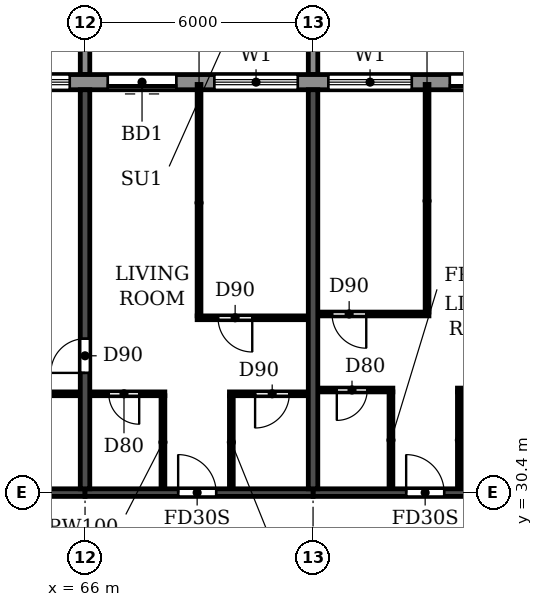
"""IFC4 building model, lengths in metres.
Left out: names, types, materials, properties, quantities, classifications, styles, units other than length and angle.
Written with IfcOpenShell. Run it as: python <this file> out.ifc"""

import sys

from ifc_helpers import new_model, si_unit, direction, frame, frame_2d, origin, place, context, subcontext, project, spatial, polyline, rectangle, outline, extrude, source, transform, mapped, element, fill, save


model = new_model("IFC4")
c1 = context("Model", 3, precision=1e-05, world=origin(), true_north=direction((0.0, 1.0)))
c2 = subcontext(c1, "Body", "Model", "MODEL_VIEW")
j1 = project(units=[si_unit("LENGTHUNIT", "METRE"), si_unit("PLANEANGLEUNIT", "RADIAN")], contexts=[c1])
p1 = place(None, origin())
s1 = spatial("IfcSite", under=j1, at=p1, CompositionType="ELEMENT")
p2 = place(p1, origin())
s2 = spatial("IfcBuilding", under=s1, at=p2, CompositionType="ELEMENT")
p3 = place(p2, frame((0.0, 0.0, 171.9)))
s3 = spatial("IfcBuildingStorey", under=s2, at=p3, CompositionType="ELEMENT", Elevation=171.9)
p4 = place(p3, frame((66.0, 30.5, 0.0), z_axis=(0.0, 0.0, 1.0), x_axis=(0.0, 1.0, 0.0)))
e1 = element("IfcWall", 1, at=p4, inside=s3, PredefinedType="SHEAR", context=c2, shape_type="SweptSolid", body=[
    extrude(rectangle(XDim=10.5, YDim=0.25, at=frame_2d((5.25, 0.0))), origin(), (0.0, 0.0, 1.0), 3.08),
])
p5 = place(p4, frame((3.05, 0.0, 0.0)))
e2 = element("IfcOpeningElement", 2, at=p5, cuts=e1, PredefinedType="OPENING", context=c2, shape_type="SweptSolid", body=[
    extrude(rectangle(XDim=0.9, YDim=2.1, at=frame_2d((0.45, 1.05))), frame((0.0, 0.135, 0.0), z_axis=(0.0, -1.0, 0.0), x_axis=(1.0, 0.0, 0.0)), (0.0, 0.0, 1.0), 0.27),
])
p6 = place(p3, frame((72.0, 30.5, 0.0), z_axis=(0.0, 0.0, 1.0), x_axis=(0.0, 1.0, 0.0)))
e3 = element("IfcWall", 3, at=p6, inside=s3, PredefinedType="SHEAR", context=c2, shape_type="SweptSolid", body=[
    extrude(rectangle(XDim=10.5, YDim=0.25, at=frame_2d((5.25, 0.0))), origin(), (0.0, 0.0, 1.0), 3.08),
])
p7 = place(p3, frame((60.0, 30.4, 0.0), z_axis=(0.0, 0.0, 1.0), x_axis=(1.0, 0.0, 0.0)))
e4 = element("IfcWall", 4, at=p7, inside=s3, PredefinedType="SHEAR", context=c2, shape_type="SweptSolid", body=[
    extrude(rectangle(XDim=6.0, YDim=0.2, at=frame_2d((3.0, 0.0))), origin(), (0.0, 0.0, 1.0), 2.48),
])
p8 = place(p3, frame((66.0, 30.4, 0.0), z_axis=(0.0, 0.0, 1.0), x_axis=(1.0, 0.0, 0.0)))
e5 = element("IfcWall", 5, at=p8, inside=s3, PredefinedType="SHEAR", context=c2, shape_type="SweptSolid", body=[
    extrude(rectangle(XDim=6.0, YDim=0.2, at=frame_2d((3.0, 0.0))), origin(), (0.0, 0.0, 1.0), 2.48),
])
p9 = place(p8, frame((2.45, 0.0, 0.0)))
e6 = element("IfcOpeningElement", 6, at=p9, cuts=e5, PredefinedType="OPENING", context=c2, shape_type="SweptSolid", body=[
    extrude(rectangle(XDim=1.0, YDim=2.1, at=frame_2d((0.5, 1.05))), frame((0.0, 0.11, 0.0), z_axis=(0.0, -1.0, 0.0), x_axis=(1.0, 0.0, 0.0)), (0.0, 0.0, 1.0), 0.22),
])
p10 = place(p3, frame((72.0, 30.4, 0.0), z_axis=(0.0, 0.0, 1.0), x_axis=(1.0, 0.0, 0.0)))
e7 = element("IfcWall", 7, at=p10, inside=s3, PredefinedType="SHEAR", context=c2, shape_type="SweptSolid", body=[
    extrude(rectangle(XDim=6.0, YDim=0.2, at=frame_2d((3.0, 0.0))), origin(), (0.0, 0.0, 1.0), 2.48),
])
p11 = place(p10, frame((2.45, 0.0, 0.0)))
e8 = element("IfcOpeningElement", 8, at=p11, cuts=e7, PredefinedType="OPENING", context=c2, shape_type="SweptSolid", body=[
    extrude(rectangle(XDim=1.0, YDim=2.1, at=frame_2d((0.5, 1.05))), frame((0.0, 0.11, 0.0), z_axis=(0.0, -1.0, 0.0), x_axis=(1.0, 0.0, 0.0)), (0.0, 0.0, 1.0), 0.22),
])
p12 = place(p3, frame((79.317, 41.2, 0.0), z_axis=(0.0, 0.0, 1.0), x_axis=(-1.0, 0.0, 0.0)))
e9 = element("IfcWall", 9, at=p12, inside=s3, PredefinedType="STANDARD", context=c2, shape_type="SweptSolid", body=[
    extrude(rectangle(XDim=56.634, YDim=0.4, at=frame_2d((28.317, 0.0))), origin(), (0.0, 0.0, 1.0), 3.08),
])
p13 = place(p12, frame((52.717, 0.0, 0.9)))
e10 = element("IfcOpeningElement", 10, at=p13, cuts=e9, PredefinedType="OPENING", context=c2, shape_type="SweptSolid", body=[
    extrude(rectangle(XDim=2.2, YDim=1.5, at=frame_2d((1.1, 0.75))), frame((0.0, 0.21, 0.0), z_axis=(0.0, -1.0, 0.0), x_axis=(1.0, 0.0, 0.0)), (0.0, 0.0, 1.0), 0.42),
])
p14 = place(p12, frame((49.917, 0.0, 0.0)))
e11 = element("IfcOpeningElement", 11, at=p14, cuts=e9, PredefinedType="OPENING", context=c2, shape_type="SweptSolid", body=[
    extrude(rectangle(XDim=1.8, YDim=2.4, at=frame_2d((0.9, 1.2))), frame((0.0, 0.21, 0.0), z_axis=(0.0, -1.0, 0.0), x_axis=(1.0, 0.0, 0.0)), (0.0, 0.0, 1.0), 0.42),
])
p15 = place(p12, frame((46.717, 0.0, 0.9)))
e12 = element("IfcOpeningElement", 12, at=p15, cuts=e9, PredefinedType="OPENING", context=c2, shape_type="SweptSolid", body=[
    extrude(rectangle(XDim=2.2, YDim=1.5, at=frame_2d((1.1, 0.75))), frame((0.0, 0.21, 0.0), z_axis=(0.0, -1.0, 0.0), x_axis=(1.0, 0.0, 0.0)), (0.0, 0.0, 1.0), 0.42),
])
p16 = place(p12, frame((43.717, 0.0, 0.9)))
e13 = element("IfcOpeningElement", 13, at=p16, cuts=e9, PredefinedType="OPENING", context=c2, shape_type="SweptSolid", body=[
    extrude(rectangle(XDim=2.2, YDim=1.5, at=frame_2d((1.1, 0.75))), frame((0.0, 0.21, 0.0), z_axis=(0.0, -1.0, 0.0), x_axis=(1.0, 0.0, 0.0)), (0.0, 0.0, 1.0), 0.42),
])
p17 = place(p12, frame((40.917, 0.0, 0.0)))
e14 = element("IfcOpeningElement", 14, at=p17, cuts=e9, PredefinedType="OPENING", context=c2, shape_type="SweptSolid", body=[
    extrude(rectangle(XDim=1.8, YDim=2.4, at=frame_2d((0.9, 1.2))), frame((0.0, 0.21, 0.0), z_axis=(0.0, -1.0, 0.0), x_axis=(1.0, 0.0, 0.0)), (0.0, 0.0, 1.0), 0.42),
])
p18 = place(p12, frame((37.717, 0.0, 0.9)))
e15 = element("IfcOpeningElement", 15, at=p18, cuts=e9, PredefinedType="OPENING", context=c2, shape_type="SweptSolid", body=[
    extrude(rectangle(XDim=2.2, YDim=1.5, at=frame_2d((1.1, 0.75))), frame((0.0, 0.21, 0.0), z_axis=(0.0, -1.0, 0.0), x_axis=(1.0, 0.0, 0.0)), (0.0, 0.0, 1.0), 0.42),
])
p19 = place(p12, frame((34.717, 0.0, 0.9)))
e16 = element("IfcOpeningElement", 16, at=p19, cuts=e9, PredefinedType="OPENING", context=c2, shape_type="SweptSolid", body=[
    extrude(rectangle(XDim=2.2, YDim=1.5, at=frame_2d((1.1, 0.75))), frame((0.0, 0.21, 0.0), z_axis=(0.0, -1.0, 0.0), x_axis=(1.0, 0.0, 0.0)), (0.0, 0.0, 1.0), 0.42),
])
p20 = place(p12, frame((31.717, 0.0, 0.9)))
e17 = element("IfcOpeningElement", 17, at=p20, cuts=e9, PredefinedType="OPENING", context=c2, shape_type="SweptSolid", body=[
    extrude(rectangle(XDim=2.2, YDim=1.5, at=frame_2d((1.1, 0.75))), frame((0.0, 0.21, 0.0), z_axis=(0.0, -1.0, 0.0), x_axis=(1.0, 0.0, 0.0)), (0.0, 0.0, 1.0), 0.42),
])
p21 = place(p12, frame((28.717, 0.0, 0.9)))
e18 = element("IfcOpeningElement", 18, at=p21, cuts=e9, PredefinedType="OPENING", context=c2, shape_type="SweptSolid", body=[
    extrude(rectangle(XDim=2.2, YDim=1.5, at=frame_2d((1.1, 0.75))), frame((0.0, 0.21, 0.0), z_axis=(0.0, -1.0, 0.0), x_axis=(1.0, 0.0, 0.0)), (0.0, 0.0, 1.0), 0.42),
])
p22 = place(p12, frame((25.917, 0.0, 0.0)))
e19 = element("IfcOpeningElement", 19, at=p22, cuts=e9, PredefinedType="OPENING", context=c2, shape_type="SweptSolid", body=[
    extrude(rectangle(XDim=1.8, YDim=2.4, at=frame_2d((0.9, 1.2))), frame((0.0, 0.21, 0.0), z_axis=(0.0, -1.0, 0.0), x_axis=(1.0, 0.0, 0.0)), (0.0, 0.0, 1.0), 0.42),
])
p23 = place(p12, frame((22.717, 0.0, 0.9)))
e20 = element("IfcOpeningElement", 20, at=p23, cuts=e9, PredefinedType="OPENING", context=c2, shape_type="SweptSolid", body=[
    extrude(rectangle(XDim=2.2, YDim=1.5, at=frame_2d((1.1, 0.75))), frame((0.0, 0.21, 0.0), z_axis=(0.0, -1.0, 0.0), x_axis=(1.0, 0.0, 0.0)), (0.0, 0.0, 1.0), 0.42),
])
p24 = place(p12, frame((19.917, 0.0, 0.0)))
e21 = element("IfcOpeningElement", 21, at=p24, cuts=e9, PredefinedType="OPENING", context=c2, shape_type="SweptSolid", body=[
    extrude(rectangle(XDim=1.8, YDim=2.4, at=frame_2d((0.9, 1.2))), frame((0.0, 0.21, 0.0), z_axis=(0.0, -1.0, 0.0), x_axis=(1.0, 0.0, 0.0)), (0.0, 0.0, 1.0), 0.42),
])
p25 = place(p12, frame((16.717, 0.0, 0.9)))
e22 = element("IfcOpeningElement", 22, at=p25, cuts=e9, PredefinedType="OPENING", context=c2, shape_type="SweptSolid", body=[
    extrude(rectangle(XDim=2.2, YDim=1.5, at=frame_2d((1.1, 0.75))), frame((0.0, 0.21, 0.0), z_axis=(0.0, -1.0, 0.0), x_axis=(1.0, 0.0, 0.0)), (0.0, 0.0, 1.0), 0.42),
])
p26 = place(p12, frame((13.717, 0.0, 0.9)))
e23 = element("IfcOpeningElement", 23, at=p26, cuts=e9, PredefinedType="OPENING", context=c2, shape_type="SweptSolid", body=[
    extrude(rectangle(XDim=2.2, YDim=1.5, at=frame_2d((1.1, 0.75))), frame((0.0, 0.21, 0.0), z_axis=(0.0, -1.0, 0.0), x_axis=(1.0, 0.0, 0.0)), (0.0, 0.0, 1.0), 0.42),
])
p27 = place(p12, frame((10.917, 0.0, 0.0)))
e24 = element("IfcOpeningElement", 24, at=p27, cuts=e9, PredefinedType="OPENING", context=c2, shape_type="SweptSolid", body=[
    extrude(rectangle(XDim=1.8, YDim=2.4, at=frame_2d((0.9, 1.2))), frame((0.0, 0.21, 0.0), z_axis=(0.0, -1.0, 0.0), x_axis=(1.0, 0.0, 0.0)), (0.0, 0.0, 1.0), 0.42),
])
p28 = place(p12, frame((7.717, 0.0, 0.9)))
e25 = element("IfcOpeningElement", 25, at=p28, cuts=e9, PredefinedType="OPENING", context=c2, shape_type="SweptSolid", body=[
    extrude(rectangle(XDim=2.2, YDim=1.5, at=frame_2d((1.1, 0.75))), frame((0.0, 0.21, 0.0), z_axis=(0.0, -1.0, 0.0), x_axis=(1.0, 0.0, 0.0)), (0.0, 0.0, 1.0), 0.42),
])
p29 = place(p12, frame((4.717, 0.0, 0.9)))
e26 = element("IfcOpeningElement", 26, at=p29, cuts=e9, PredefinedType="OPENING", context=c2, shape_type="SweptSolid", body=[
    extrude(rectangle(XDim=2.2, YDim=1.5, at=frame_2d((1.1, 0.75))), frame((0.0, 0.21, 0.0), z_axis=(0.0, -1.0, 0.0), x_axis=(1.0, 0.0, 0.0)), (0.0, 0.0, 1.0), 0.42),
])
p30 = place(p12, frame((1.917, 0.0, 0.0)))
e27 = element("IfcOpeningElement", 27, at=p30, cuts=e9, PredefinedType="OPENING", context=c2, shape_type="SweptSolid", body=[
    extrude(rectangle(XDim=1.8, YDim=2.4, at=frame_2d((0.9, 1.2))), frame((0.0, 0.21, 0.0), z_axis=(0.0, -1.0, 0.0), x_axis=(1.0, 0.0, 0.0)), (0.0, 0.0, 1.0), 0.42),
])
m1 = source(origin(), c2, "Body", "SweptSolid", [
    extrude(outline(polyline([(0.0, 0.0), (0.25, 0.0), (0.25, 3.1), (0.0, 3.1), (0.0, 0.0)])), origin(), (0.0, 0.0, 1.0), 3.1),
])
for number, where in (
    (28, (65.875, 41.4, 0.0)),
    (29, (71.875, 41.4, 0.0)),
):
    element("IfcWall", number, at=place(p3, frame(where)), inside=s3, PredefinedType="STANDARD", context=c2, shape_type="MappedRepresentation", body=[
        mapped(m1, transform((0.0, 0.0, 0.0))),
    ])
p31 = place(p3, frame((63.1, 33.0, 0.0), z_axis=(0.0, 0.0, 1.0), x_axis=(1.0, 0.0, 0.0)))
e30 = element("IfcWall", 30, at=p31, inside=s3, PredefinedType="PARTITIONING", context=c2, shape_type="SweptSolid", body=[
    extrude(rectangle(XDim=2.765, YDim=0.1, at=frame_2d((1.382, 0.0))), origin(), (0.0, 0.0, 1.0), 3.08),
])
p32 = place(p31, frame((1.0, 0.0, 0.0)))
e31 = element("IfcOpeningElement", 31, at=p32, cuts=e30, PredefinedType="OPENING", context=c2, shape_type="SweptSolid", body=[
    extrude(rectangle(XDim=0.8, YDim=2.1, at=frame_2d((0.4, 1.05))), frame((0.0, 0.06, 0.0), z_axis=(0.0, -1.0, 0.0), x_axis=(1.0, 0.0, 0.0)), (0.0, 0.0, 1.0), 0.12),
])
p33 = place(p3, frame((66.135, 33.0, 0.0), z_axis=(0.0, 0.0, 1.0), x_axis=(1.0, 0.0, 0.0)))
e32 = element("IfcWall", 32, at=p33, inside=s3, PredefinedType="PARTITIONING", context=c2, shape_type="SweptSolid", body=[
    extrude(rectangle(XDim=1.965, YDim=0.1, at=frame_2d((0.982, 0.0))), origin(), (0.0, 0.0, 1.0), 3.08),
])
p34 = place(p33, frame((0.49, 0.0, 0.0)))
e33 = element("IfcOpeningElement", 33, at=p34, cuts=e32, PredefinedType="OPENING", context=c2, shape_type="SweptSolid", body=[
    extrude(rectangle(XDim=0.8, YDim=2.1, at=frame_2d((0.4, 1.05))), frame((0.0, 0.06, 0.0), z_axis=(0.0, -1.0, 0.0), x_axis=(1.0, 0.0, 0.0)), (0.0, 0.0, 1.0), 0.12),
])
p35 = place(p3, frame((69.8, 33.0, 0.0), z_axis=(0.0, 0.0, 1.0), x_axis=(1.0, 0.0, 0.0)))
e34 = element("IfcWall", 34, at=p35, inside=s3, PredefinedType="PARTITIONING", context=c2, shape_type="SweptSolid", body=[
    extrude(rectangle(XDim=2.065, YDim=0.1, at=frame_2d((1.032, 0.0))), origin(), (0.0, 0.0, 1.0), 3.08),
])
p36 = place(p35, frame((0.675, 0.0, 0.0)))
e35 = element("IfcOpeningElement", 35, at=p36, cuts=e34, PredefinedType="OPENING", context=c2, shape_type="SweptSolid", body=[
    extrude(rectangle(XDim=0.9, YDim=2.1, at=frame_2d((0.45, 1.05))), frame((0.0, 0.06, 0.0), z_axis=(0.0, -1.0, 0.0), x_axis=(1.0, 0.0, 0.0)), (0.0, 0.0, 1.0), 0.12),
])
p37 = place(p3, frame((72.135, 33.1, 0.0), z_axis=(0.0, 0.0, 1.0), x_axis=(1.0, 0.0, 0.0)))
e36 = element("IfcWall", 36, at=p37, inside=s3, PredefinedType="PARTITIONING", context=c2, shape_type="SweptSolid", body=[
    extrude(rectangle(XDim=1.965, YDim=0.1, at=frame_2d((0.982, 0.0))), origin(), (0.0, 0.0, 1.0), 3.08),
])
p38 = place(p37, frame((0.49, 0.0, 0.0)))
e37 = element("IfcOpeningElement", 37, at=p38, cuts=e36, PredefinedType="OPENING", context=c2, shape_type="SweptSolid", body=[
    extrude(rectangle(XDim=0.8, YDim=2.1, at=frame_2d((0.4, 1.05))), frame((0.0, 0.06, 0.0), z_axis=(0.0, -1.0, 0.0), x_axis=(1.0, 0.0, 0.0)), (0.0, 0.0, 1.0), 0.12),
])
p39 = place(p3, frame((75.8, 33.1, 0.0), z_axis=(0.0, 0.0, 1.0), x_axis=(1.0, 0.0, 0.0)))
e38 = element("IfcWall", 38, at=p39, inside=s3, PredefinedType="PARTITIONING", context=c2, shape_type="SweptSolid", body=[
    extrude(rectangle(XDim=2.065, YDim=0.1, at=frame_2d((1.032, 0.0))), origin(), (0.0, 0.0, 1.0), 3.08),
])
p40 = place(p39, frame((0.675, 0.0, 0.0)))
e39 = element("IfcOpeningElement", 39, at=p40, cuts=e38, PredefinedType="OPENING", context=c2, shape_type="SweptSolid", body=[
    extrude(rectangle(XDim=0.9, YDim=2.1, at=frame_2d((0.45, 1.05))), frame((0.0, 0.06, 0.0), z_axis=(0.0, -1.0, 0.0), x_axis=(1.0, 0.0, 0.0)), (0.0, 0.0, 1.0), 0.12),
])
p41 = place(p3, frame((68.95, 35.0, 0.0), z_axis=(0.0, 0.0, 1.0), x_axis=(1.0, 0.0, 0.0)))
e40 = element("IfcWall", 40, at=p41, inside=s3, PredefinedType="PARTITIONING", context=c2, shape_type="SweptSolid", body=[
    extrude(rectangle(XDim=2.915, YDim=0.1, at=frame_2d((1.458, 0.0))), origin(), (0.0, 0.0, 1.0), 3.08),
])
p42 = place(p41, frame((0.55, 0.0, 0.0)))
e41 = element("IfcOpeningElement", 41, at=p42, cuts=e40, PredefinedType="OPENING", context=c2, shape_type="SweptSolid", body=[
    extrude(rectangle(XDim=0.9, YDim=2.1, at=frame_2d((0.45, 1.05))), frame((0.0, 0.06, 0.0), z_axis=(0.0, -1.0, 0.0), x_axis=(1.0, 0.0, 0.0)), (0.0, 0.0, 1.0), 0.12),
])
p43 = place(p3, frame((72.135, 35.1, 0.0), z_axis=(0.0, 0.0, 1.0), x_axis=(1.0, 0.0, 0.0)))
e42 = element("IfcWall", 42, at=p43, inside=s3, PredefinedType="PARTITIONING", context=c2, shape_type="SweptSolid", body=[
    extrude(rectangle(XDim=2.915, YDim=0.1, at=frame_2d((1.458, 0.0))), origin(), (0.0, 0.0, 1.0), 3.08),
])
p44 = place(p43, frame((0.365, 0.0, 0.0)))
e43 = element("IfcOpeningElement", 43, at=p44, cuts=e42, PredefinedType="OPENING", context=c2, shape_type="SweptSolid", body=[
    extrude(rectangle(XDim=0.9, YDim=2.1, at=frame_2d((0.45, 1.05))), frame((0.0, 0.06, 0.0), z_axis=(0.0, -1.0, 0.0), x_axis=(1.0, 0.0, 0.0)), (0.0, 0.0, 1.0), 0.12),
])
p45 = place(p3, frame((68.05, 30.51, 0.0), z_axis=(0.0, 0.0, 1.0), x_axis=(0.0, 1.0, 0.0)))
e44 = element("IfcWall", 44, at=p45, inside=s3, PredefinedType="PARTITIONING", context=c2, shape_type="SweptSolid", body=[
    extrude(rectangle(XDim=2.44, YDim=0.1, at=frame_2d((1.22, 0.0))), origin(), (0.0, 0.0, 1.0), 3.08),
])
p46 = place(p3, frame((69.0, 35.05, 0.0), z_axis=(0.0, 0.0, 1.0), x_axis=(0.0, 1.0, 0.0)))
e45 = element("IfcWall", 45, at=p46, inside=s3, PredefinedType="PARTITIONING", context=c2, shape_type="SweptSolid", body=[
    extrude(rectangle(XDim=6.09, YDim=0.1, at=frame_2d((3.045, 0.0))), origin(), (0.0, 0.0, 1.0), 3.08),
])
p47 = place(p3, frame((69.85, 30.51, 0.0), z_axis=(0.0, 0.0, 1.0), x_axis=(0.0, 1.0, 0.0)))
e46 = element("IfcWall", 46, at=p47, inside=s3, PredefinedType="PARTITIONING", context=c2, shape_type="SweptSolid", body=[
    extrude(rectangle(XDim=2.44, YDim=0.1, at=frame_2d((1.22, 0.0))), origin(), (0.0, 0.0, 1.0), 3.08),
])
p48 = place(p3, frame((74.05, 30.51, 0.0), z_axis=(0.0, 0.0, 1.0), x_axis=(0.0, 1.0, 0.0)))
e47 = element("IfcWall", 47, at=p48, inside=s3, PredefinedType="PARTITIONING", context=c2, shape_type="SweptSolid", body=[
    extrude(rectangle(XDim=2.54, YDim=0.1, at=frame_2d((1.27, 0.0))), origin(), (0.0, 0.0, 1.0), 3.08),
])
p49 = place(p3, frame((75.0, 35.15, 0.0), z_axis=(0.0, 0.0, 1.0), x_axis=(0.0, 1.0, 0.0)))
e48 = element("IfcWall", 48, at=p49, inside=s3, PredefinedType="PARTITIONING", context=c2, shape_type="SweptSolid", body=[
    extrude(rectangle(XDim=5.99, YDim=0.1, at=frame_2d((2.995, 0.0))), origin(), (0.0, 0.0, 1.0), 3.08),
])
p50 = place(p3, frame((75.85, 30.51, 0.0), z_axis=(0.0, 0.0, 1.0), x_axis=(0.0, 1.0, 0.0)))
e49 = element("IfcWall", 49, at=p50, inside=s3, PredefinedType="PARTITIONING", context=c2, shape_type="SweptSolid", body=[
    extrude(rectangle(XDim=2.54, YDim=0.1, at=frame_2d((1.27, 0.0))), origin(), (0.0, 0.0, 1.0), 3.08),
])
p51 = place(p26, origin())
e50 = element("IfcWindow", 50, at=p51, inside=s3, PartitioningType="DOUBLE_PANEL_HORIZONTAL", PredefinedType="WINDOW", context=c2, shape_type="SweptSolid", body=[
    extrude(rectangle(XDim=2.2, YDim=1.5, at=frame_2d((1.1, 0.75))), frame((0.0, 0.03, 0.0), z_axis=(0.0, -1.0, 0.0), x_axis=(1.0, 0.0, 0.0)), (0.0, 0.0, 1.0), 0.06),
])
fill(e23, e50)
p52 = place(p27, origin())
e51 = element("IfcDoor", 51, at=p52, inside=s3, OperationType="DOUBLE_DOOR_SLIDING", PredefinedType="DOOR", context=c2, shape_type="SweptSolid", body=[
    extrude(rectangle(XDim=1.8, YDim=2.4, at=frame_2d((0.9, 1.2))), frame((0.0, 0.025, 0.0), z_axis=(0.0, -1.0, 0.0), x_axis=(1.0, 0.0, 0.0)), (0.0, 0.0, 1.0), 0.05),
])
fill(e24, e51)
p53 = place(p28, origin())
e52 = element("IfcWindow", 52, at=p53, inside=s3, PartitioningType="DOUBLE_PANEL_HORIZONTAL", PredefinedType="WINDOW", context=c2, shape_type="SweptSolid", body=[
    extrude(rectangle(XDim=2.2, YDim=1.5, at=frame_2d((1.1, 0.75))), frame((0.0, 0.03, 0.0), z_axis=(0.0, -1.0, 0.0), x_axis=(1.0, 0.0, 0.0)), (0.0, 0.0, 1.0), 0.06),
])
fill(e25, e52)
p54 = place(p29, origin())
e53 = element("IfcWindow", 53, at=p54, inside=s3, PartitioningType="DOUBLE_PANEL_HORIZONTAL", PredefinedType="WINDOW", context=c2, shape_type="SweptSolid", body=[
    extrude(rectangle(XDim=2.2, YDim=1.5, at=frame_2d((1.1, 0.75))), frame((0.0, 0.03, 0.0), z_axis=(0.0, -1.0, 0.0), x_axis=(1.0, 0.0, 0.0)), (0.0, 0.0, 1.0), 0.06),
])
fill(e26, e53)
p55 = place(p30, origin())
e54 = element("IfcDoor", 54, at=p55, inside=s3, OperationType="DOUBLE_DOOR_SLIDING", PredefinedType="DOOR", context=c2, shape_type="SweptSolid", body=[
    extrude(rectangle(XDim=1.8, YDim=2.4, at=frame_2d((0.9, 1.2))), frame((0.0, 0.025, 0.0), z_axis=(0.0, -1.0, 0.0), x_axis=(1.0, 0.0, 0.0)), (0.0, 0.0, 1.0), 0.05),
])
fill(e27, e54)
p56 = place(p5, origin())
e55 = element("IfcDoor", 55, at=p56, inside=s3, OperationType="SINGLE_SWING_LEFT", PredefinedType="DOOR", context=c2, shape_type="SweptSolid", body=[
    extrude(rectangle(XDim=0.9, YDim=2.1, at=frame_2d((0.45, 1.05))), frame((0.0, 0.025, 0.0), z_axis=(0.0, -1.0, 0.0), x_axis=(1.0, 0.0, 0.0)), (0.0, 0.0, 1.0), 0.05),
])
fill(e2, e55)
p57 = place(p34, frame((0.8, 0.0, 0.0), z_axis=(0.0, 0.0, 1.0), x_axis=(-1.0, 0.0, 0.0)))
e56 = element("IfcDoor", 56, at=p57, inside=s3, OperationType="SINGLE_SWING_LEFT", PredefinedType="DOOR", context=c2, shape_type="SweptSolid", body=[
    extrude(rectangle(XDim=0.8, YDim=2.1, at=frame_2d((0.4, 1.05))), frame((0.0, 0.025, 0.0), z_axis=(0.0, -1.0, 0.0), x_axis=(1.0, 0.0, 0.0)), (0.0, 0.0, 1.0), 0.05),
])
fill(e33, e56)
p58 = place(p9, origin())
e57 = element("IfcDoor", 57, at=p58, inside=s3, OperationType="SINGLE_SWING_LEFT", PredefinedType="DOOR", context=c2, shape_type="SweptSolid", body=[
    extrude(rectangle(XDim=1.0, YDim=2.1, at=frame_2d((0.5, 1.05))), frame((0.0, 0.025, 0.0), z_axis=(0.0, -1.0, 0.0), x_axis=(1.0, 0.0, 0.0)), (0.0, 0.0, 1.0), 0.05),
])
fill(e6, e57)
p59 = place(p42, frame((0.9, 0.0, 0.0), z_axis=(0.0, 0.0, 1.0), x_axis=(-1.0, 0.0, 0.0)))
e58 = element("IfcDoor", 58, at=p59, inside=s3, OperationType="SINGLE_SWING_LEFT", PredefinedType="DOOR", context=c2, shape_type="SweptSolid", body=[
    extrude(rectangle(XDim=0.9, YDim=2.1, at=frame_2d((0.45, 1.05))), frame((0.0, 0.025, 0.0), z_axis=(0.0, -1.0, 0.0), x_axis=(1.0, 0.0, 0.0)), (0.0, 0.0, 1.0), 0.05),
])
fill(e41, e58)
p60 = place(p36, frame((0.9, 0.0, 0.0), z_axis=(0.0, 0.0, 1.0), x_axis=(-1.0, 0.0, 0.0)))
e59 = element("IfcDoor", 59, at=p60, inside=s3, OperationType="SINGLE_SWING_RIGHT", PredefinedType="DOOR", context=c2, shape_type="SweptSolid", body=[
    extrude(rectangle(XDim=0.9, YDim=2.1, at=frame_2d((0.45, 1.05))), frame((0.0, 0.025, 0.0), z_axis=(0.0, -1.0, 0.0), x_axis=(1.0, 0.0, 0.0)), (0.0, 0.0, 1.0), 0.05),
])
fill(e35, e59)
p61 = place(p44, frame((0.9, 0.0, 0.0), z_axis=(0.0, 0.0, 1.0), x_axis=(-1.0, 0.0, 0.0)))
e60 = element("IfcDoor", 60, at=p61, inside=s3, OperationType="SINGLE_SWING_LEFT", PredefinedType="DOOR", context=c2, shape_type="SweptSolid", body=[
    extrude(rectangle(XDim=0.9, YDim=2.1, at=frame_2d((0.45, 1.05))), frame((0.0, 0.025, 0.0), z_axis=(0.0, -1.0, 0.0), x_axis=(1.0, 0.0, 0.0)), (0.0, 0.0, 1.0), 0.05),
])
fill(e43, e60)
p62 = place(p38, frame((0.8, 0.0, 0.0), z_axis=(0.0, 0.0, 1.0), x_axis=(-1.0, 0.0, 0.0)))
e61 = element("IfcDoor", 61, at=p62, inside=s3, OperationType="SINGLE_SWING_RIGHT", PredefinedType="DOOR", context=c2, shape_type="SweptSolid", body=[
    extrude(rectangle(XDim=0.8, YDim=2.1, at=frame_2d((0.4, 1.05))), frame((0.0, 0.025, 0.0), z_axis=(0.0, -1.0, 0.0), x_axis=(1.0, 0.0, 0.0)), (0.0, 0.0, 1.0), 0.05),
])
fill(e37, e61)
p63 = place(p11, origin())
e62 = element("IfcDoor", 62, at=p63, inside=s3, OperationType="SINGLE_SWING_LEFT", PredefinedType="DOOR", context=c2, shape_type="SweptSolid", body=[
    extrude(rectangle(XDim=1.0, YDim=2.1, at=frame_2d((0.5, 1.05))), frame((0.0, 0.025, 0.0), z_axis=(0.0, -1.0, 0.0), x_axis=(1.0, 0.0, 0.0)), (0.0, 0.0, 1.0), 0.05),
])
fill(e8, e62)
save(model, sys.argv[1])
